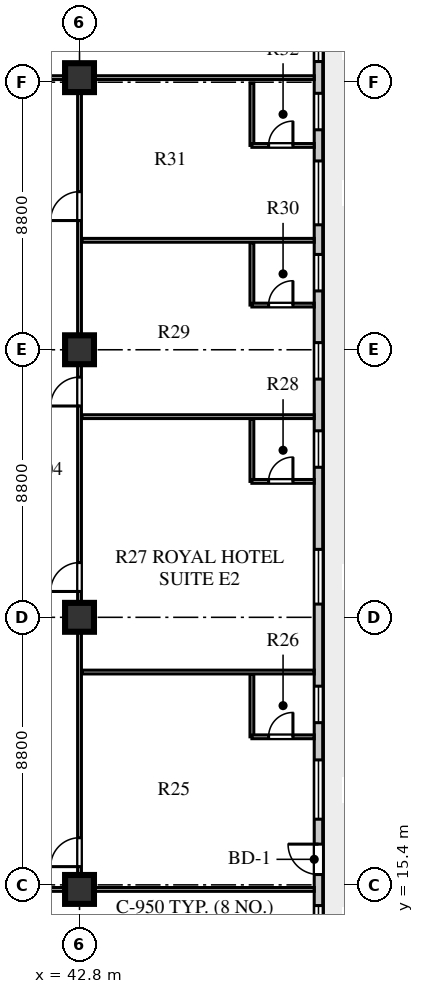
"""IFC4 building model, lengths in metres.
Left out: names, types, materials, properties, quantities, classifications, styles, units other than length and angle.
Written with IfcOpenShell. Run it as: python <this file> out.ifc"""

import sys

from ifc_helpers import new_model, si_unit, direction, frame, frame_2d, origin, origin_2d, place, context, subcontext, project, spatial, rectangle, extrude, element, fill, save


model = new_model("IFC4")
c1 = context("Model", 3, precision=1e-05, world=origin(), true_north=direction((0.0, 1.0)))
c2 = subcontext(c1, "Body", "Model", "MODEL_VIEW")
j1 = project(units=[si_unit("LENGTHUNIT", "METRE"), si_unit("PLANEANGLEUNIT", "RADIAN")], contexts=[c1])
p1 = place(None, origin())
s1 = spatial("IfcSite", under=j1, at=p1, CompositionType="ELEMENT")
p2 = place(p1, origin())
s2 = spatial("IfcBuilding", under=s1, at=p2, CompositionType="ELEMENT")
p3 = place(p2, frame((0.0, 0.0, 165.6)))
s3 = spatial("IfcBuildingStorey", under=s2, at=p3, CompositionType="ELEMENT", Elevation=165.6)
for number, where, z_axis, x_axis in (
    (1, (42.8, 15.25, 0.0), (0.0, 0.0, 1.0), (1.0, 0.0, 0.0)),
    (2, (42.8, 24.2, 0.0), (0.0, 0.0, 1.0), (1.0, 0.0, 0.0)),
    (3, (42.8, 33.0, 0.0), (0.0, 0.0, 1.0), (1.0, 0.0, 0.0)),
    (4, (42.8, 41.95, 0.0), (0.0, 0.0, 1.0), (1.0, 0.0, 0.0)),
):
    element("IfcColumn", number, at=place(p3, frame(where, z_axis=z_axis, x_axis=x_axis)), inside=s3, PredefinedType="COLUMN", context=c2, shape_type="SweptSolid", body=[
        extrude(rectangle(XDim=0.95, YDim=0.95, at=origin_2d()), origin(), (0.0, 0.0, 1.0), 3.6),
    ])
p4 = place(p3, frame((50.66, 13.13, 0.0), z_axis=(0.0, 0.0, 1.0), x_axis=(0.0, 1.0, 0.0)))
e5 = element("IfcWall", 5, at=p4, inside=s3, PredefinedType="STANDARD", context=c2, shape_type="SweptSolid", body=[
    extrude(rectangle(XDim=30.94, YDim=0.28, at=frame_2d((15.47, 0.0))), origin(), (0.0, 0.0, 1.0), 3.6),
])
p5 = place(p4, frame((0.64, 0.0, 0.8)))
e6 = element("IfcOpeningElement", 6, at=p5, cuts=e5, PredefinedType="OPENING", context=c2, shape_type="SweptSolid", body=[
    extrude(rectangle(XDim=0.95, YDim=1.65, at=frame_2d((0.475, 0.825))), frame((0.0, 0.15, 0.0), z_axis=(0.0, -1.0, 0.0), x_axis=(1.0, 0.0, 0.0)), (0.0, 0.0, 1.0), 0.3),
])
p6 = place(p4, frame((2.61, 0.0, 0.0)))
e7 = element("IfcOpeningElement", 7, at=p6, cuts=e5, PredefinedType="OPENING", context=c2, shape_type="SweptSolid", body=[
    extrude(rectangle(XDim=1.0, YDim=2.05, at=frame_2d((0.5, 1.025))), frame((0.0, 0.15, 0.0), z_axis=(0.0, -1.0, 0.0), x_axis=(1.0, 0.0, 0.0)), (0.0, 0.0, 1.0), 0.3),
])
p7 = place(p4, frame((4.43, 0.0, 0.8)))
e8 = element("IfcOpeningElement", 8, at=p7, cuts=e5, PredefinedType="OPENING", context=c2, shape_type="SweptSolid", body=[
    extrude(rectangle(XDim=1.95, YDim=2.0, at=frame_2d((0.975, 1.0))), frame((0.0, 0.15, 0.0), z_axis=(0.0, -1.0, 0.0), x_axis=(1.0, 0.0, 0.0)), (0.0, 0.0, 1.0), 0.3),
])
p8 = place(p4, frame((7.605, 0.0, 0.8)))
e9 = element("IfcOpeningElement", 9, at=p8, cuts=e5, PredefinedType="OPENING", context=c2, shape_type="SweptSolid", body=[
    extrude(rectangle(XDim=1.2, YDim=1.75, at=frame_2d((0.6, 0.875))), frame((0.0, 0.15, 0.0), z_axis=(0.0, -1.0, 0.0), x_axis=(1.0, 0.0, 0.0)), (0.0, 0.0, 1.0), 0.3),
])
p9 = place(p4, frame((11.505, 0.0, 0.8)))
e10 = element("IfcOpeningElement", 10, at=p9, cuts=e5, PredefinedType="OPENING", context=c2, shape_type="SweptSolid", body=[
    extrude(rectangle(XDim=1.8, YDim=2.0, at=frame_2d((0.9, 1.0))), frame((0.0, 0.15, 0.0), z_axis=(0.0, -1.0, 0.0), x_axis=(1.0, 0.0, 0.0)), (0.0, 0.0, 1.0), 0.3),
])
p10 = place(p4, frame((16.005, 0.0, 0.8)))
e11 = element("IfcOpeningElement", 11, at=p10, cuts=e5, PredefinedType="OPENING", context=c2, shape_type="SweptSolid", body=[
    extrude(rectangle(XDim=1.2, YDim=1.75, at=frame_2d((0.6, 0.875))), frame((0.0, 0.15, 0.0), z_axis=(0.0, -1.0, 0.0), x_axis=(1.0, 0.0, 0.0)), (0.0, 0.0, 1.0), 0.3),
])
p11 = place(p4, frame((18.905, 0.0, 0.8)))
e12 = element("IfcOpeningElement", 12, at=p11, cuts=e5, PredefinedType="OPENING", context=c2, shape_type="SweptSolid", body=[
    extrude(rectangle(XDim=1.2, YDim=1.75, at=frame_2d((0.6, 0.875))), frame((0.0, 0.15, 0.0), z_axis=(0.0, -1.0, 0.0), x_axis=(1.0, 0.0, 0.0)), (0.0, 0.0, 1.0), 0.3),
])
p12 = place(p4, frame((21.805, 0.0, 0.8)))
e13 = element("IfcOpeningElement", 13, at=p12, cuts=e5, PredefinedType="OPENING", context=c2, shape_type="SweptSolid", body=[
    extrude(rectangle(XDim=1.2, YDim=1.75, at=frame_2d((0.6, 0.875))), frame((0.0, 0.15, 0.0), z_axis=(0.0, -1.0, 0.0), x_axis=(1.0, 0.0, 0.0)), (0.0, 0.0, 1.0), 0.3),
])
p13 = place(p4, frame((23.98, 0.0, 0.8)))
e14 = element("IfcOpeningElement", 14, at=p13, cuts=e5, PredefinedType="OPENING", context=c2, shape_type="SweptSolid", body=[
    extrude(rectangle(XDim=2.1, YDim=1.95, at=frame_2d((1.05, 0.975))), frame((0.0, 0.15, 0.0), z_axis=(0.0, -1.0, 0.0), x_axis=(1.0, 0.0, 0.0)), (0.0, 0.0, 1.0), 0.3),
])
p14 = place(p4, frame((27.105, 0.0, 0.8)))
e15 = element("IfcOpeningElement", 15, at=p14, cuts=e5, PredefinedType="OPENING", context=c2, shape_type="SweptSolid", body=[
    extrude(rectangle(XDim=1.2, YDim=1.75, at=frame_2d((0.6, 0.875))), frame((0.0, 0.15, 0.0), z_axis=(0.0, -1.0, 0.0), x_axis=(1.0, 0.0, 0.0)), (0.0, 0.0, 1.0), 0.3),
])
p15 = place(p4, frame((29.35, 0.0, 0.8)))
e16 = element("IfcOpeningElement", 16, at=p15, cuts=e5, PredefinedType="OPENING", context=c2, shape_type="SweptSolid", body=[
    extrude(rectangle(XDim=0.95, YDim=1.65, at=frame_2d((0.475, 0.825))), frame((0.0, 0.15, 0.0), z_axis=(0.0, -1.0, 0.0), x_axis=(1.0, 0.0, 0.0)), (0.0, 0.0, 1.0), 0.3),
])
p16 = place(p3, frame((42.8, 15.25, 0.0), z_axis=(0.0, 0.0, 1.0), x_axis=(0.0, 1.0, 0.0)))
e17 = element("IfcWall", 17, at=p16, inside=s3, PredefinedType="PLUMBINGWALL", context=c2, shape_type="SweptSolid", body=[
    extrude(rectangle(XDim=26.7, YDim=0.125, at=frame_2d((13.35, 0.0))), origin(), (0.0, 0.0, 1.0), 2.95),
])
p17 = place(p16, frame((0.75, 0.0, 0.0)))
e18 = element("IfcOpeningElement", 18, at=p17, cuts=e17, PredefinedType="OPENING", context=c2, shape_type="SweptSolid", body=[
    extrude(rectangle(XDim=0.95, YDim=2.1, at=frame_2d((0.475, 1.05))), frame((0.0, 0.073, 0.0), z_axis=(0.0, -1.0, 0.0), x_axis=(1.0, 0.0, 0.0)), (0.0, 0.0, 1.0), 0.145),
])
p18 = place(p16, frame((9.8, 0.0, 0.0)))
e19 = element("IfcOpeningElement", 19, at=p18, cuts=e17, PredefinedType="OPENING", context=c2, shape_type="SweptSolid", body=[
    extrude(rectangle(XDim=0.95, YDim=2.1, at=frame_2d((0.475, 1.05))), frame((0.0, 0.073, 0.0), z_axis=(0.0, -1.0, 0.0), x_axis=(1.0, 0.0, 0.0)), (0.0, 0.0, 1.0), 0.145),
])
p19 = place(p16, frame((15.9, 0.0, 0.0)))
e20 = element("IfcOpeningElement", 20, at=p19, cuts=e17, PredefinedType="OPENING", context=c2, shape_type="SweptSolid", body=[
    extrude(rectangle(XDim=0.95, YDim=2.1, at=frame_2d((0.475, 1.05))), frame((0.0, 0.073, 0.0), z_axis=(0.0, -1.0, 0.0), x_axis=(1.0, 0.0, 0.0)), (0.0, 0.0, 1.0), 0.145),
])
p20 = place(p16, frame((22.0, 0.0, 0.0)))
e21 = element("IfcOpeningElement", 21, at=p20, cuts=e17, PredefinedType="OPENING", context=c2, shape_type="SweptSolid", body=[
    extrude(rectangle(XDim=0.95, YDim=2.1, at=frame_2d((0.475, 1.05))), frame((0.0, 0.073, 0.0), z_axis=(0.0, -1.0, 0.0), x_axis=(1.0, 0.0, 0.0)), (0.0, 0.0, 1.0), 0.145),
])
for number, where, z_axis, x_axis in (
    (22, (40.82, 15.25, 0.0), (0.0, 0.0, 1.0), (1.0, 0.0, 0.0)),
    (23, (40.82, 41.95, 0.0), (0.0, 0.0, 1.0), (1.0, 0.0, 0.0)),
):
    element("IfcWall", number, at=place(p3, frame(where, z_axis=z_axis, x_axis=x_axis)), inside=s3, PredefinedType="PLUMBINGWALL", context=c2, shape_type="SweptSolid", body=[
        extrude(rectangle(XDim=9.7, YDim=0.125, at=frame_2d((4.85, 0.0))), origin(), (0.0, 0.0, 1.0), 2.95),
    ])
p21 = place(p3, frame((48.47, 20.27, 0.0), z_axis=(0.0, 0.0, 1.0), x_axis=(0.0, 1.0, 0.0)))
e24 = element("IfcWall", 24, at=p21, inside=s3, PredefinedType="PLUMBINGWALL", context=c2, shape_type="SweptSolid", body=[
    extrude(rectangle(XDim=2.05, YDim=0.125, at=frame_2d((1.025, 0.0))), origin(), (0.0, 0.0, 1.0), 3.6),
])
p22 = place(p3, frame((48.47, 20.27, 0.0), z_axis=(0.0, 0.0, 1.0), x_axis=(1.0, 0.0, 0.0)))
e25 = element("IfcWall", 25, at=p22, inside=s3, PredefinedType="PLUMBINGWALL", context=c2, shape_type="SweptSolid", body=[
    extrude(rectangle(XDim=2.05, YDim=0.125, at=frame_2d((1.025, 0.0))), origin(), (0.0, 0.0, 1.0), 3.6),
])
p23 = place(p22, frame((0.55, 0.0, 0.0)))
e26 = element("IfcOpeningElement", 26, at=p23, cuts=e25, PredefinedType="OPENING", context=c2, shape_type="SweptSolid", body=[
    extrude(rectangle(XDim=0.8, YDim=2.05, at=frame_2d((0.4, 1.025))), frame((0.0, 0.073, 0.0), z_axis=(0.0, -1.0, 0.0), x_axis=(1.0, 0.0, 0.0)), (0.0, 0.0, 1.0), 0.145),
])
p24 = place(p3, frame((42.88, 22.4, 0.0), z_axis=(0.0, 0.0, 1.0), x_axis=(1.0, 0.0, 0.0)))
e27 = element("IfcWall", 27, at=p24, inside=s3, PredefinedType="PLUMBINGWALL", context=c2, shape_type="SweptSolid", body=[
    extrude(rectangle(XDim=7.64, YDim=0.125, at=frame_2d((3.82, 0.0))), origin(), (0.0, 0.0, 1.0), 3.6),
])
p25 = place(p3, frame((48.47, 28.67, 0.0), z_axis=(0.0, 0.0, 1.0), x_axis=(0.0, 1.0, 0.0)))
e28 = element("IfcWall", 28, at=p25, inside=s3, PredefinedType="PLUMBINGWALL", context=c2, shape_type="SweptSolid", body=[
    extrude(rectangle(XDim=2.05, YDim=0.125, at=frame_2d((1.025, 0.0))), origin(), (0.0, 0.0, 1.0), 3.6),
])
p26 = place(p3, frame((48.47, 28.67, 0.0), z_axis=(0.0, 0.0, 1.0), x_axis=(1.0, 0.0, 0.0)))
e29 = element("IfcWall", 29, at=p26, inside=s3, PredefinedType="PLUMBINGWALL", context=c2, shape_type="SweptSolid", body=[
    extrude(rectangle(XDim=2.05, YDim=0.125, at=frame_2d((1.025, 0.0))), origin(), (0.0, 0.0, 1.0), 3.6),
])
p27 = place(p26, frame((0.55, 0.0, 0.0)))
e30 = element("IfcOpeningElement", 30, at=p27, cuts=e29, PredefinedType="OPENING", context=c2, shape_type="SweptSolid", body=[
    extrude(rectangle(XDim=0.8, YDim=2.05, at=frame_2d((0.4, 1.025))), frame((0.0, 0.073, 0.0), z_axis=(0.0, -1.0, 0.0), x_axis=(1.0, 0.0, 0.0)), (0.0, 0.0, 1.0), 0.145),
])
p28 = place(p3, frame((42.88, 30.8, 0.0), z_axis=(0.0, 0.0, 1.0), x_axis=(1.0, 0.0, 0.0)))
e31 = element("IfcWall", 31, at=p28, inside=s3, PredefinedType="PLUMBINGWALL", context=c2, shape_type="SweptSolid", body=[
    extrude(rectangle(XDim=7.64, YDim=0.125, at=frame_2d((3.82, 0.0))), origin(), (0.0, 0.0, 1.0), 3.6),
])
p29 = place(p3, frame((48.47, 34.47, 0.0), z_axis=(0.0, 0.0, 1.0), x_axis=(0.0, 1.0, 0.0)))
e32 = element("IfcWall", 32, at=p29, inside=s3, PredefinedType="PLUMBINGWALL", context=c2, shape_type="SweptSolid", body=[
    extrude(rectangle(XDim=2.05, YDim=0.125, at=frame_2d((1.025, 0.0))), origin(), (0.0, 0.0, 1.0), 3.6),
])
p30 = place(p3, frame((48.47, 34.47, 0.0), z_axis=(0.0, 0.0, 1.0), x_axis=(1.0, 0.0, 0.0)))
e33 = element("IfcWall", 33, at=p30, inside=s3, PredefinedType="PLUMBINGWALL", context=c2, shape_type="SweptSolid", body=[
    extrude(rectangle(XDim=2.05, YDim=0.125, at=frame_2d((1.025, 0.0))), origin(), (0.0, 0.0, 1.0), 3.6),
])
p31 = place(p30, frame((0.55, 0.0, 0.0)))
e34 = element("IfcOpeningElement", 34, at=p31, cuts=e33, PredefinedType="OPENING", context=c2, shape_type="SweptSolid", body=[
    extrude(rectangle(XDim=0.8, YDim=2.05, at=frame_2d((0.4, 1.025))), frame((0.0, 0.073, 0.0), z_axis=(0.0, -1.0, 0.0), x_axis=(1.0, 0.0, 0.0)), (0.0, 0.0, 1.0), 0.145),
])
p32 = place(p3, frame((42.88, 36.6, 0.0), z_axis=(0.0, 0.0, 1.0), x_axis=(1.0, 0.0, 0.0)))
e35 = element("IfcWall", 35, at=p32, inside=s3, PredefinedType="PLUMBINGWALL", context=c2, shape_type="SweptSolid", body=[
    extrude(rectangle(XDim=7.64, YDim=0.125, at=frame_2d((3.82, 0.0))), origin(), (0.0, 0.0, 1.0), 3.6),
])
p33 = place(p3, frame((48.47, 39.72, 0.0), z_axis=(0.0, 0.0, 1.0), x_axis=(0.0, 1.0, 0.0)))
e36 = element("IfcWall", 36, at=p33, inside=s3, PredefinedType="PLUMBINGWALL", context=c2, shape_type="SweptSolid", body=[
    extrude(rectangle(XDim=2.05, YDim=0.125, at=frame_2d((1.025, 0.0))), origin(), (0.0, 0.0, 1.0), 3.6),
])
p34 = place(p3, frame((48.47, 39.72, 0.0), z_axis=(0.0, 0.0, 1.0), x_axis=(1.0, 0.0, 0.0)))
e37 = element("IfcWall", 37, at=p34, inside=s3, PredefinedType="PLUMBINGWALL", context=c2, shape_type="SweptSolid", body=[
    extrude(rectangle(XDim=2.05, YDim=0.125, at=frame_2d((1.025, 0.0))), origin(), (0.0, 0.0, 1.0), 3.6),
])
p35 = place(p34, frame((0.55, 0.0, 0.0)))
e38 = element("IfcOpeningElement", 38, at=p35, cuts=e37, PredefinedType="OPENING", context=c2, shape_type="SweptSolid", body=[
    extrude(rectangle(XDim=0.8, YDim=2.05, at=frame_2d((0.4, 1.025))), frame((0.0, 0.073, 0.0), z_axis=(0.0, -1.0, 0.0), x_axis=(1.0, 0.0, 0.0)), (0.0, 0.0, 1.0), 0.145),
])
p36 = place(p5, origin())
e39 = element("IfcWindow", 39, at=p36, inside=s3, PartitioningType="SINGLE_PANEL", PredefinedType="WINDOW", context=c2, shape_type="SweptSolid", body=[
    extrude(rectangle(XDim=0.95, YDim=1.65, at=frame_2d((0.475, 0.825))), frame((0.0, 0.03, 0.0), z_axis=(0.0, -1.0, 0.0), x_axis=(1.0, 0.0, 0.0)), (0.0, 0.0, 1.0), 0.06),
])
fill(e6, e39)
p37 = place(p6, frame((1.0, 0.0, 0.0), z_axis=(0.0, 0.0, 1.0), x_axis=(-1.0, 0.0, 0.0)))
e40 = element("IfcDoor", 40, at=p37, inside=s3, OperationType="SINGLE_SWING_LEFT", PredefinedType="DOOR", context=c2, shape_type="SweptSolid", body=[
    extrude(rectangle(XDim=1.0, YDim=2.05, at=frame_2d((0.5, 1.025))), frame((0.0, 0.025, 0.0), z_axis=(0.0, -1.0, 0.0), x_axis=(1.0, 0.0, 0.0)), (0.0, 0.0, 1.0), 0.05),
])
fill(e7, e40)
p38 = place(p7, origin())
e41 = element("IfcWindow", 41, at=p38, inside=s3, PartitioningType="SINGLE_PANEL", PredefinedType="WINDOW", context=c2, shape_type="SweptSolid", body=[
    extrude(rectangle(XDim=1.95, YDim=2.0, at=frame_2d((0.975, 1.0))), frame((0.0, 0.03, 0.0), z_axis=(0.0, -1.0, 0.0), x_axis=(1.0, 0.0, 0.0)), (0.0, 0.0, 1.0), 0.06),
])
fill(e8, e41)
p39 = place(p8, origin())
e42 = element("IfcWindow", 42, at=p39, inside=s3, PartitioningType="SINGLE_PANEL", PredefinedType="WINDOW", context=c2, shape_type="SweptSolid", body=[
    extrude(rectangle(XDim=1.2, YDim=1.75, at=frame_2d((0.6, 0.875))), frame((0.0, 0.03, 0.0), z_axis=(0.0, -1.0, 0.0), x_axis=(1.0, 0.0, 0.0)), (0.0, 0.0, 1.0), 0.06),
])
fill(e9, e42)
p40 = place(p9, origin())
e43 = element("IfcWindow", 43, at=p40, inside=s3, PartitioningType="SINGLE_PANEL", PredefinedType="WINDOW", context=c2, shape_type="SweptSolid", body=[
    extrude(rectangle(XDim=1.8, YDim=2.0, at=frame_2d((0.9, 1.0))), frame((0.0, 0.03, 0.0), z_axis=(0.0, -1.0, 0.0), x_axis=(1.0, 0.0, 0.0)), (0.0, 0.0, 1.0), 0.06),
])
fill(e10, e43)
p41 = place(p10, origin())
e44 = element("IfcWindow", 44, at=p41, inside=s3, PartitioningType="SINGLE_PANEL", PredefinedType="WINDOW", context=c2, shape_type="SweptSolid", body=[
    extrude(rectangle(XDim=1.2, YDim=1.75, at=frame_2d((0.6, 0.875))), frame((0.0, 0.03, 0.0), z_axis=(0.0, -1.0, 0.0), x_axis=(1.0, 0.0, 0.0)), (0.0, 0.0, 1.0), 0.06),
])
fill(e11, e44)
p42 = place(p11, origin())
e45 = element("IfcWindow", 45, at=p42, inside=s3, PartitioningType="SINGLE_PANEL", PredefinedType="WINDOW", context=c2, shape_type="SweptSolid", body=[
    extrude(rectangle(XDim=1.2, YDim=1.75, at=frame_2d((0.6, 0.875))), frame((0.0, 0.03, 0.0), z_axis=(0.0, -1.0, 0.0), x_axis=(1.0, 0.0, 0.0)), (0.0, 0.0, 1.0), 0.06),
])
fill(e12, e45)
p43 = place(p12, origin())
e46 = element("IfcWindow", 46, at=p43, inside=s3, PartitioningType="SINGLE_PANEL", PredefinedType="WINDOW", context=c2, shape_type="SweptSolid", body=[
    extrude(rectangle(XDim=1.2, YDim=1.75, at=frame_2d((0.6, 0.875))), frame((0.0, 0.03, 0.0), z_axis=(0.0, -1.0, 0.0), x_axis=(1.0, 0.0, 0.0)), (0.0, 0.0, 1.0), 0.06),
])
fill(e13, e46)
p44 = place(p13, origin())
e47 = element("IfcWindow", 47, at=p44, inside=s3, PartitioningType="SINGLE_PANEL", PredefinedType="WINDOW", context=c2, shape_type="SweptSolid", body=[
    extrude(rectangle(XDim=2.1, YDim=1.95, at=frame_2d((1.05, 0.975))), frame((0.0, 0.03, 0.0), z_axis=(0.0, -1.0, 0.0), x_axis=(1.0, 0.0, 0.0)), (0.0, 0.0, 1.0), 0.06),
])
fill(e14, e47)
p45 = place(p14, origin())
e48 = element("IfcWindow", 48, at=p45, inside=s3, PartitioningType="SINGLE_PANEL", PredefinedType="WINDOW", context=c2, shape_type="SweptSolid", body=[
    extrude(rectangle(XDim=1.2, YDim=1.75, at=frame_2d((0.6, 0.875))), frame((0.0, 0.03, 0.0), z_axis=(0.0, -1.0, 0.0), x_axis=(1.0, 0.0, 0.0)), (0.0, 0.0, 1.0), 0.06),
])
fill(e15, e48)
p46 = place(p15, origin())
e49 = element("IfcWindow", 49, at=p46, inside=s3, PartitioningType="SINGLE_PANEL", PredefinedType="WINDOW", context=c2, shape_type="SweptSolid", body=[
    extrude(rectangle(XDim=0.95, YDim=1.65, at=frame_2d((0.475, 0.825))), frame((0.0, 0.03, 0.0), z_axis=(0.0, -1.0, 0.0), x_axis=(1.0, 0.0, 0.0)), (0.0, 0.0, 1.0), 0.06),
])
fill(e16, e49)
p47 = place(p17, origin())
e50 = element("IfcDoor", 50, at=p47, inside=s3, OperationType="SINGLE_SWING_LEFT", PredefinedType="DOOR", context=c2, shape_type="SweptSolid", body=[
    extrude(rectangle(XDim=0.95, YDim=2.1, at=frame_2d((0.475, 1.05))), frame((0.0, 0.025, 0.0), z_axis=(0.0, -1.0, 0.0), x_axis=(1.0, 0.0, 0.0)), (0.0, 0.0, 1.0), 0.05),
])
fill(e18, e50)
p48 = place(p23, frame((0.8, 0.0, 0.0), z_axis=(0.0, 0.0, 1.0), x_axis=(-1.0, 0.0, 0.0)))
e51 = element("IfcDoor", 51, at=p48, inside=s3, OperationType="SINGLE_SWING_LEFT", PredefinedType="DOOR", context=c2, shape_type="SweptSolid", body=[
    extrude(rectangle(XDim=0.8, YDim=2.05, at=frame_2d((0.4, 1.025))), frame((0.0, 0.025, 0.0), z_axis=(0.0, -1.0, 0.0), x_axis=(1.0, 0.0, 0.0)), (0.0, 0.0, 1.0), 0.05),
])
fill(e26, e51)
p49 = place(p18, origin())
e52 = element("IfcDoor", 52, at=p49, inside=s3, OperationType="SINGLE_SWING_LEFT", PredefinedType="DOOR", context=c2, shape_type="SweptSolid", body=[
    extrude(rectangle(XDim=0.95, YDim=2.1, at=frame_2d((0.475, 1.05))), frame((0.0, 0.025, 0.0), z_axis=(0.0, -1.0, 0.0), x_axis=(1.0, 0.0, 0.0)), (0.0, 0.0, 1.0), 0.05),
])
fill(e19, e52)
p50 = place(p27, frame((0.8, 0.0, 0.0), z_axis=(0.0, 0.0, 1.0), x_axis=(-1.0, 0.0, 0.0)))
e53 = element("IfcDoor", 53, at=p50, inside=s3, OperationType="SINGLE_SWING_LEFT", PredefinedType="DOOR", context=c2, shape_type="SweptSolid", body=[
    extrude(rectangle(XDim=0.8, YDim=2.05, at=frame_2d((0.4, 1.025))), frame((0.0, 0.025, 0.0), z_axis=(0.0, -1.0, 0.0), x_axis=(1.0, 0.0, 0.0)), (0.0, 0.0, 1.0), 0.05),
])
fill(e30, e53)
p51 = place(p19, origin())
e54 = element("IfcDoor", 54, at=p51, inside=s3, OperationType="SINGLE_SWING_LEFT", PredefinedType="DOOR", context=c2, shape_type="SweptSolid", body=[
    extrude(rectangle(XDim=0.95, YDim=2.1, at=frame_2d((0.475, 1.05))), frame((0.0, 0.025, 0.0), z_axis=(0.0, -1.0, 0.0), x_axis=(1.0, 0.0, 0.0)), (0.0, 0.0, 1.0), 0.05),
])
fill(e20, e54)
p52 = place(p31, frame((0.8, 0.0, 0.0), z_axis=(0.0, 0.0, 1.0), x_axis=(-1.0, 0.0, 0.0)))
e55 = element("IfcDoor", 55, at=p52, inside=s3, OperationType="SINGLE_SWING_LEFT", PredefinedType="DOOR", context=c2, shape_type="SweptSolid", body=[
    extrude(rectangle(XDim=0.8, YDim=2.05, at=frame_2d((0.4, 1.025))), frame((0.0, 0.025, 0.0), z_axis=(0.0, -1.0, 0.0), x_axis=(1.0, 0.0, 0.0)), (0.0, 0.0, 1.0), 0.05),
])
fill(e34, e55)
p53 = place(p20, origin())
e56 = element("IfcDoor", 56, at=p53, inside=s3, OperationType="SINGLE_SWING_LEFT", PredefinedType="DOOR", context=c2, shape_type="SweptSolid", body=[
    extrude(rectangle(XDim=0.95, YDim=2.1, at=frame_2d((0.475, 1.05))), frame((0.0, 0.025, 0.0), z_axis=(0.0, -1.0, 0.0), x_axis=(1.0, 0.0, 0.0)), (0.0, 0.0, 1.0), 0.05),
])
fill(e21, e56)
p54 = place(p35, frame((0.8, 0.0, 0.0), z_axis=(0.0, 0.0, 1.0), x_axis=(-1.0, 0.0, 0.0)))
e57 = element("IfcDoor", 57, at=p54, inside=s3, OperationType="SINGLE_SWING_LEFT", PredefinedType="DOOR", context=c2, shape_type="SweptSolid", body=[
    extrude(rectangle(XDim=0.8, YDim=2.05, at=frame_2d((0.4, 1.025))), frame((0.0, 0.025, 0.0), z_axis=(0.0, -1.0, 0.0), x_axis=(1.0, 0.0, 0.0)), (0.0, 0.0, 1.0), 0.05),
])
fill(e38, e57)
save(model, sys.argv[1])
